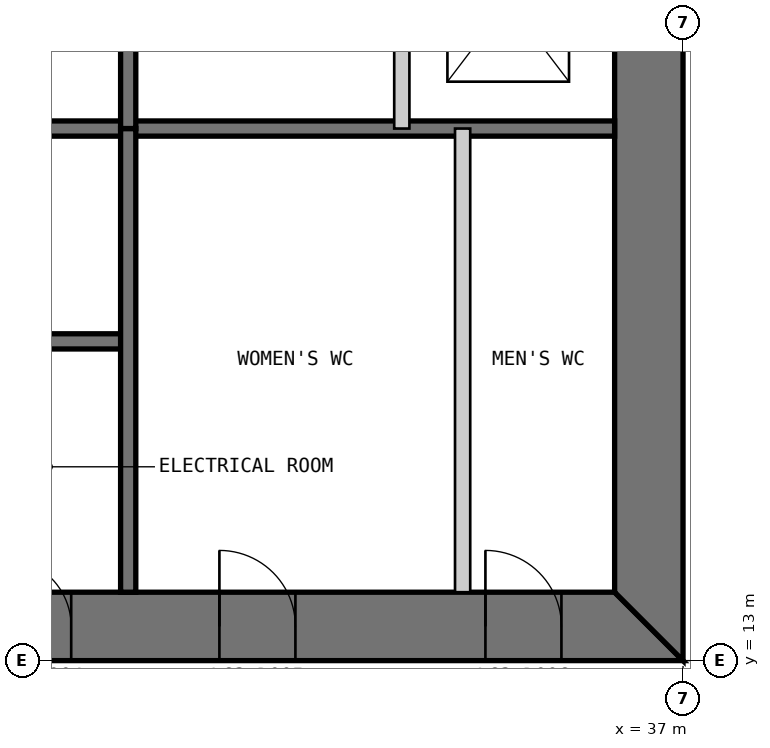
"""IFC4 building model, lengths in metres.
Left out: names, types, materials, properties, quantities, classifications, styles, units other than length and angle.
Written with IfcOpenShell. Run it as: python <this file> out.ifc"""

import sys

from ifc_helpers import new_model, si_unit, direction, frame, frame_2d, origin, place, context, subcontext, project, spatial, polyline, rectangle, outline, extrude, element, fill, save


model = new_model("IFC4")
c1 = context("Model", 3, precision=1e-05, world=origin(), true_north=direction((0.0, 1.0)))
c2 = subcontext(c1, "Body", "Model", "MODEL_VIEW")
j1 = project(units=[si_unit("LENGTHUNIT", "METRE"), si_unit("PLANEANGLEUNIT", "RADIAN")], contexts=[c1])
p1 = place(None, origin())
s1 = spatial("IfcSite", under=j1, at=p1, CompositionType="ELEMENT")
p2 = place(p1, origin())
s2 = spatial("IfcBuilding", under=s1, at=p2, CompositionType="ELEMENT")
p3 = place(p2, frame((0.0, 0.0, 266.2)))
s3 = spatial("IfcBuildingStorey", under=s2, at=p3, CompositionType="ELEMENT", Elevation=266.2)
p4 = place(p3, frame((13.0, 13.45, 0.0), z_axis=(0.0, 0.0, 1.0), x_axis=(1.0, 0.0, 0.0)))
e1 = element("IfcWall", 1, at=p4, inside=s3, PredefinedType="SHEAR", context=c2, shape_type="SweptSolid", body=[
    extrude(outline(polyline([(0.0, -0.45), (24.0, -0.45), (23.1, 0.45), (0.9, 0.45), (0.0, -0.45)])), origin(), (0.0, 0.0, 1.0), 3.4),
])
p5 = place(p4, frame((4.9, 0.0, 0.0)))
e2 = element("IfcOpeningElement", 2, at=p5, cuts=e1, PredefinedType="OPENING", context=c2, shape_type="SweptSolid", body=[
    extrude(rectangle(XDim=1.0, YDim=2.2, at=frame_2d((0.5, 1.1))), frame((0.0, 0.46, 0.0), z_axis=(0.0, -1.0, 0.0), x_axis=(1.0, 0.0, 0.0)), (0.0, 0.0, 1.0), 0.92),
])
p6 = place(p4, frame((8.9, 0.0, 0.0)))
e3 = element("IfcOpeningElement", 3, at=p6, cuts=e1, PredefinedType="OPENING", context=c2, shape_type="SweptSolid", body=[
    extrude(rectangle(XDim=1.1, YDim=2.2, at=frame_2d((0.55, 1.1))), frame((0.0, 0.46, 0.0), z_axis=(0.0, -1.0, 0.0), x_axis=(1.0, 0.0, 0.0)), (0.0, 0.0, 1.0), 0.92),
])
p7 = place(p4, frame((15.05, 0.0, 0.0)))
e4 = element("IfcOpeningElement", 4, at=p7, cuts=e1, PredefinedType="OPENING", context=c2, shape_type="SweptSolid", body=[
    extrude(rectangle(XDim=0.9, YDim=2.2, at=frame_2d((0.45, 1.1))), frame((0.0, 0.46, 0.0), z_axis=(0.0, -1.0, 0.0), x_axis=(1.0, 0.0, 0.0)), (0.0, 0.0, 1.0), 0.92),
])
p8 = place(p4, frame((17.9, 0.0, 0.0)))
e5 = element("IfcOpeningElement", 5, at=p8, cuts=e1, PredefinedType="OPENING", context=c2, shape_type="SweptSolid", body=[
    extrude(rectangle(XDim=1.0, YDim=2.2, at=frame_2d((0.5, 1.1))), frame((0.0, 0.46, 0.0), z_axis=(0.0, -1.0, 0.0), x_axis=(1.0, 0.0, 0.0)), (0.0, 0.0, 1.0), 0.92),
])
p9 = place(p4, frame((21.4, 0.0, 0.0)))
e6 = element("IfcOpeningElement", 6, at=p9, cuts=e1, PredefinedType="OPENING", context=c2, shape_type="SweptSolid", body=[
    extrude(rectangle(XDim=1.0, YDim=2.2, at=frame_2d((0.5, 1.1))), frame((0.0, 0.46, 0.0), z_axis=(0.0, -1.0, 0.0), x_axis=(1.0, 0.0, 0.0)), (0.0, 0.0, 1.0), 0.92),
])
p10 = place(p3, frame((36.55, 13.9, 0.0), z_axis=(0.0, 0.0, 1.0), x_axis=(0.0, 1.0, 0.0)))
e7 = element("IfcWall", 7, at=p10, inside=s3, PredefinedType="SHEAR", context=c2, shape_type="SweptSolid", body=[
    extrude(outline(polyline([(-0.9, -0.45), (23.1, -0.45), (22.2, 0.45), (0.0, 0.45), (-0.9, -0.45)])), origin(), (0.0, 0.0, 1.0), 3.4),
])
p11 = place(p10, frame((20.2, 0.0, 0.0)))
e8 = element("IfcOpeningElement", 8, at=p11, cuts=e7, PredefinedType="OPENING", context=c2, shape_type="SweptSolid", body=[
    extrude(rectangle(XDim=1.0, YDim=2.2, at=frame_2d((0.5, 1.1))), frame((0.0, 0.46, 0.0), z_axis=(0.0, -1.0, 0.0), x_axis=(1.0, 0.0, 0.0)), (0.0, 0.0, 1.0), 0.92),
])
p12 = place(p10, frame((17.25, 0.0, 0.0)))
e9 = element("IfcOpeningElement", 9, at=p12, cuts=e7, PredefinedType="OPENING", context=c2, shape_type="SweptSolid", body=[
    extrude(rectangle(XDim=0.9, YDim=2.2, at=frame_2d((0.45, 1.1))), frame((0.0, 0.46, 0.0), z_axis=(0.0, -1.0, 0.0), x_axis=(1.0, 0.0, 0.0)), (0.0, 0.0, 1.0), 0.92),
])
p13 = place(p3, frame((20.3, 17.2, 0.0), z_axis=(0.0, 0.0, 1.0), x_axis=(1.0, 0.0, 0.0)))
e10 = element("IfcWall", 10, at=p13, inside=s3, PredefinedType="SOLIDWALL", context=c2, shape_type="SweptSolid", body=[
    extrude(rectangle(XDim=9.4, YDim=0.2, at=frame_2d((4.7, 0.0))), origin(), (0.0, 0.0, 1.0), 3.2),
])
p14 = place(p13, frame((0.25, 0.0, 0.0)))
e11 = element("IfcOpeningElement", 11, at=p14, cuts=e10, PredefinedType="OPENING", context=c2, shape_type="SweptSolid", body=[
    extrude(rectangle(XDim=1.0, YDim=2.2, at=frame_2d((0.5, 1.1))), frame((0.0, 0.11, 0.0), z_axis=(0.0, -1.0, 0.0), x_axis=(1.0, 0.0, 0.0)), (0.0, 0.0, 1.0), 0.22),
])
p15 = place(p3, frame((20.3, 20.0, 0.0), z_axis=(0.0, 0.0, 1.0), x_axis=(1.0, 0.0, 0.0)))
e12 = element("IfcWall", 12, at=p15, inside=s3, PredefinedType="SOLIDWALL", context=c2, shape_type="SweptSolid", body=[
    extrude(rectangle(XDim=15.8, YDim=0.2, at=frame_2d((7.9, 0.0))), origin(), (0.0, 0.0, 1.0), 3.2),
])
p16 = place(p3, frame((29.7, 13.9, 0.0), z_axis=(0.0, 0.0, 1.0), x_axis=(0.0, 1.0, 0.0)))
e13 = element("IfcWall", 13, at=p16, inside=s3, PredefinedType="SOLIDWALL", context=c2, shape_type="SweptSolid", body=[
    extrude(rectangle(XDim=6.1, YDim=0.2, at=frame_2d((3.05, 0.0))), origin(), (0.0, 0.0, 1.0), 3.2),
])
p17 = place(p3, frame((34.1, 13.9, 0.0), z_axis=(0.0, 0.0, 1.0), x_axis=(0.0, 1.0, 0.0)))
e14 = element("IfcWall", 14, at=p17, inside=s3, PredefinedType="PARTITIONING", context=c2, shape_type="SweptSolid", body=[
    extrude(rectangle(XDim=6.1, YDim=0.2, at=frame_2d((3.05, 0.0))), origin(), (0.0, 0.0, 1.0), 3.2),
])
p18 = place(p3, frame((33.3, 36.1, 0.0), z_axis=(0.0, 0.0, 1.0), x_axis=(0.0, -1.0, 0.0)))
e15 = element("IfcWall", 15, at=p18, inside=s3, PredefinedType="PARTITIONING", context=c2, shape_type="SweptSolid", body=[
    extrude(rectangle(XDim=16.1, YDim=0.2, at=frame_2d((8.05, 0.0))), origin(), (0.0, 0.0, 1.0), 3.2),
])
p19 = place(p18, frame((7.217, 0.0, 0.0)))
e16 = element("IfcOpeningElement", 16, at=p19, cuts=e15, PredefinedType="OPENING", context=c2, shape_type="SweptSolid", body=[
    extrude(rectangle(XDim=1.1, YDim=2.2, at=frame_2d((0.55, 1.1))), frame((0.0, 0.11, 0.0), z_axis=(0.0, -1.0, 0.0), x_axis=(1.0, 0.0, 0.0)), (0.0, 0.0, 1.0), 0.22),
])
p20 = place(p18, frame((10.55, 0.0, 0.0)))
e17 = element("IfcOpeningElement", 17, at=p20, cuts=e15, PredefinedType="OPENING", context=c2, shape_type="SweptSolid", body=[
    extrude(rectangle(XDim=1.1, YDim=2.2, at=frame_2d((0.55, 1.1))), frame((0.0, 0.11, 0.0), z_axis=(0.0, -1.0, 0.0), x_axis=(1.0, 0.0, 0.0)), (0.0, 0.0, 1.0), 0.22),
])
p21 = place(p18, frame((13.883, 0.0, 0.0)))
e18 = element("IfcOpeningElement", 18, at=p21, cuts=e15, PredefinedType="OPENING", context=c2, shape_type="SweptSolid", body=[
    extrude(rectangle(XDim=1.1, YDim=2.2, at=frame_2d((0.55, 1.1))), frame((0.0, 0.11, 0.0), z_axis=(0.0, -1.0, 0.0), x_axis=(1.0, 0.0, 0.0)), (0.0, 0.0, 1.0), 0.22),
])
p22 = place(p3, frame((29.7, 36.1, 0.0), z_axis=(0.0, 0.0, 1.0), x_axis=(0.0, -1.0, 0.0)))
e19 = element("IfcWall", 19, at=p22, inside=s3, PredefinedType="SOLIDWALL", context=c2, shape_type="SweptSolid", body=[
    extrude(rectangle(XDim=16.1, YDim=0.2, at=frame_2d((8.05, 0.0))), origin(), (0.0, 0.0, 1.0), 3.2),
])
p23 = place(p22, frame((6.65, 0.0, 0.0)))
e20 = element("IfcOpeningElement", 20, at=p23, cuts=e19, PredefinedType="OPENING", context=c2, shape_type="SweptSolid", body=[
    extrude(rectangle(XDim=0.9, YDim=2.2, at=frame_2d((0.45, 1.1))), frame((0.0, 0.11, 0.0), z_axis=(0.0, -1.0, 0.0), x_axis=(1.0, 0.0, 0.0)), (0.0, 0.0, 1.0), 0.22),
])
p24 = place(p22, frame((9.15, 0.0, 0.0)))
e21 = element("IfcOpeningElement", 21, at=p24, cuts=e19, PredefinedType="OPENING", context=c2, shape_type="SweptSolid", body=[
    extrude(rectangle(XDim=0.9, YDim=2.2, at=frame_2d((0.45, 1.1))), frame((0.0, 0.11, 0.0), z_axis=(0.0, -1.0, 0.0), x_axis=(1.0, 0.0, 0.0)), (0.0, 0.0, 1.0), 0.22),
])
p25 = place(p22, frame((13.15, 0.0, 0.0)))
e22 = element("IfcOpeningElement", 22, at=p25, cuts=e19, PredefinedType="OPENING", context=c2, shape_type="SweptSolid", body=[
    extrude(rectangle(XDim=0.9, YDim=2.2, at=frame_2d((0.45, 1.1))), frame((0.0, 0.11, 0.0), z_axis=(0.0, -1.0, 0.0), x_axis=(1.0, 0.0, 0.0)), (0.0, 0.0, 1.0), 0.22),
])
p26 = place(p7, origin())
e23 = element("IfcDoor", 23, at=p26, inside=s3, OperationType="SINGLE_SWING_LEFT", PredefinedType="DOOR", context=c2, shape_type="SweptSolid", body=[
    extrude(rectangle(XDim=0.9, YDim=2.2, at=frame_2d((0.45, 1.1))), frame((0.0, 0.025, 0.0), z_axis=(0.0, -1.0, 0.0), x_axis=(1.0, 0.0, 0.0)), (0.0, 0.0, 1.0), 0.05),
    extrude(outline(polyline([(0.0, 0.0), (0.04, 0.0), (0.04, 2.16), (0.86, 2.16), (0.86, 0.0), (0.9, 0.0), (0.9, 2.2), (0.0, 2.2), (0.0, 0.0)])), frame((0.0, 0.3, 0.0), z_axis=(0.0, -1.0, 0.0), x_axis=(1.0, 0.0, 0.0)), (0.0, 0.0, 1.0), 0.6),
])
fill(e4, e23)
p27 = place(p8, origin())
e24 = element("IfcDoor", 24, at=p27, inside=s3, OperationType="SINGLE_SWING_LEFT", PredefinedType="DOOR", context=c2, shape_type="SweptSolid", body=[
    extrude(rectangle(XDim=1.0, YDim=2.2, at=frame_2d((0.5, 1.1))), frame((0.0, 0.025, 0.0), z_axis=(0.0, -1.0, 0.0), x_axis=(1.0, 0.0, 0.0)), (0.0, 0.0, 1.0), 0.05),
    extrude(outline(polyline([(0.0, 0.0), (0.04, 0.0), (0.04, 2.16), (0.96, 2.16), (0.96, 0.0), (1.0, 0.0), (1.0, 2.2), (0.0, 2.2), (0.0, 0.0)])), frame((0.0, 0.3, 0.0), z_axis=(0.0, -1.0, 0.0), x_axis=(1.0, 0.0, 0.0)), (0.0, 0.0, 1.0), 0.6),
])
fill(e5, e24)
p28 = place(p9, origin())
e25 = element("IfcDoor", 25, at=p28, inside=s3, OperationType="SINGLE_SWING_LEFT", PredefinedType="DOOR", context=c2, shape_type="SweptSolid", body=[
    extrude(rectangle(XDim=1.0, YDim=2.2, at=frame_2d((0.5, 1.1))), frame((0.0, 0.025, 0.0), z_axis=(0.0, -1.0, 0.0), x_axis=(1.0, 0.0, 0.0)), (0.0, 0.0, 1.0), 0.05),
    extrude(outline(polyline([(0.0, 0.0), (0.04, 0.0), (0.04, 2.16), (0.96, 2.16), (0.96, 0.0), (1.0, 0.0), (1.0, 2.2), (0.0, 2.2), (0.0, 0.0)])), frame((0.0, 0.3, 0.0), z_axis=(0.0, -1.0, 0.0), x_axis=(1.0, 0.0, 0.0)), (0.0, 0.0, 1.0), 0.6),
])
fill(e6, e25)
save(model, sys.argv[1])
